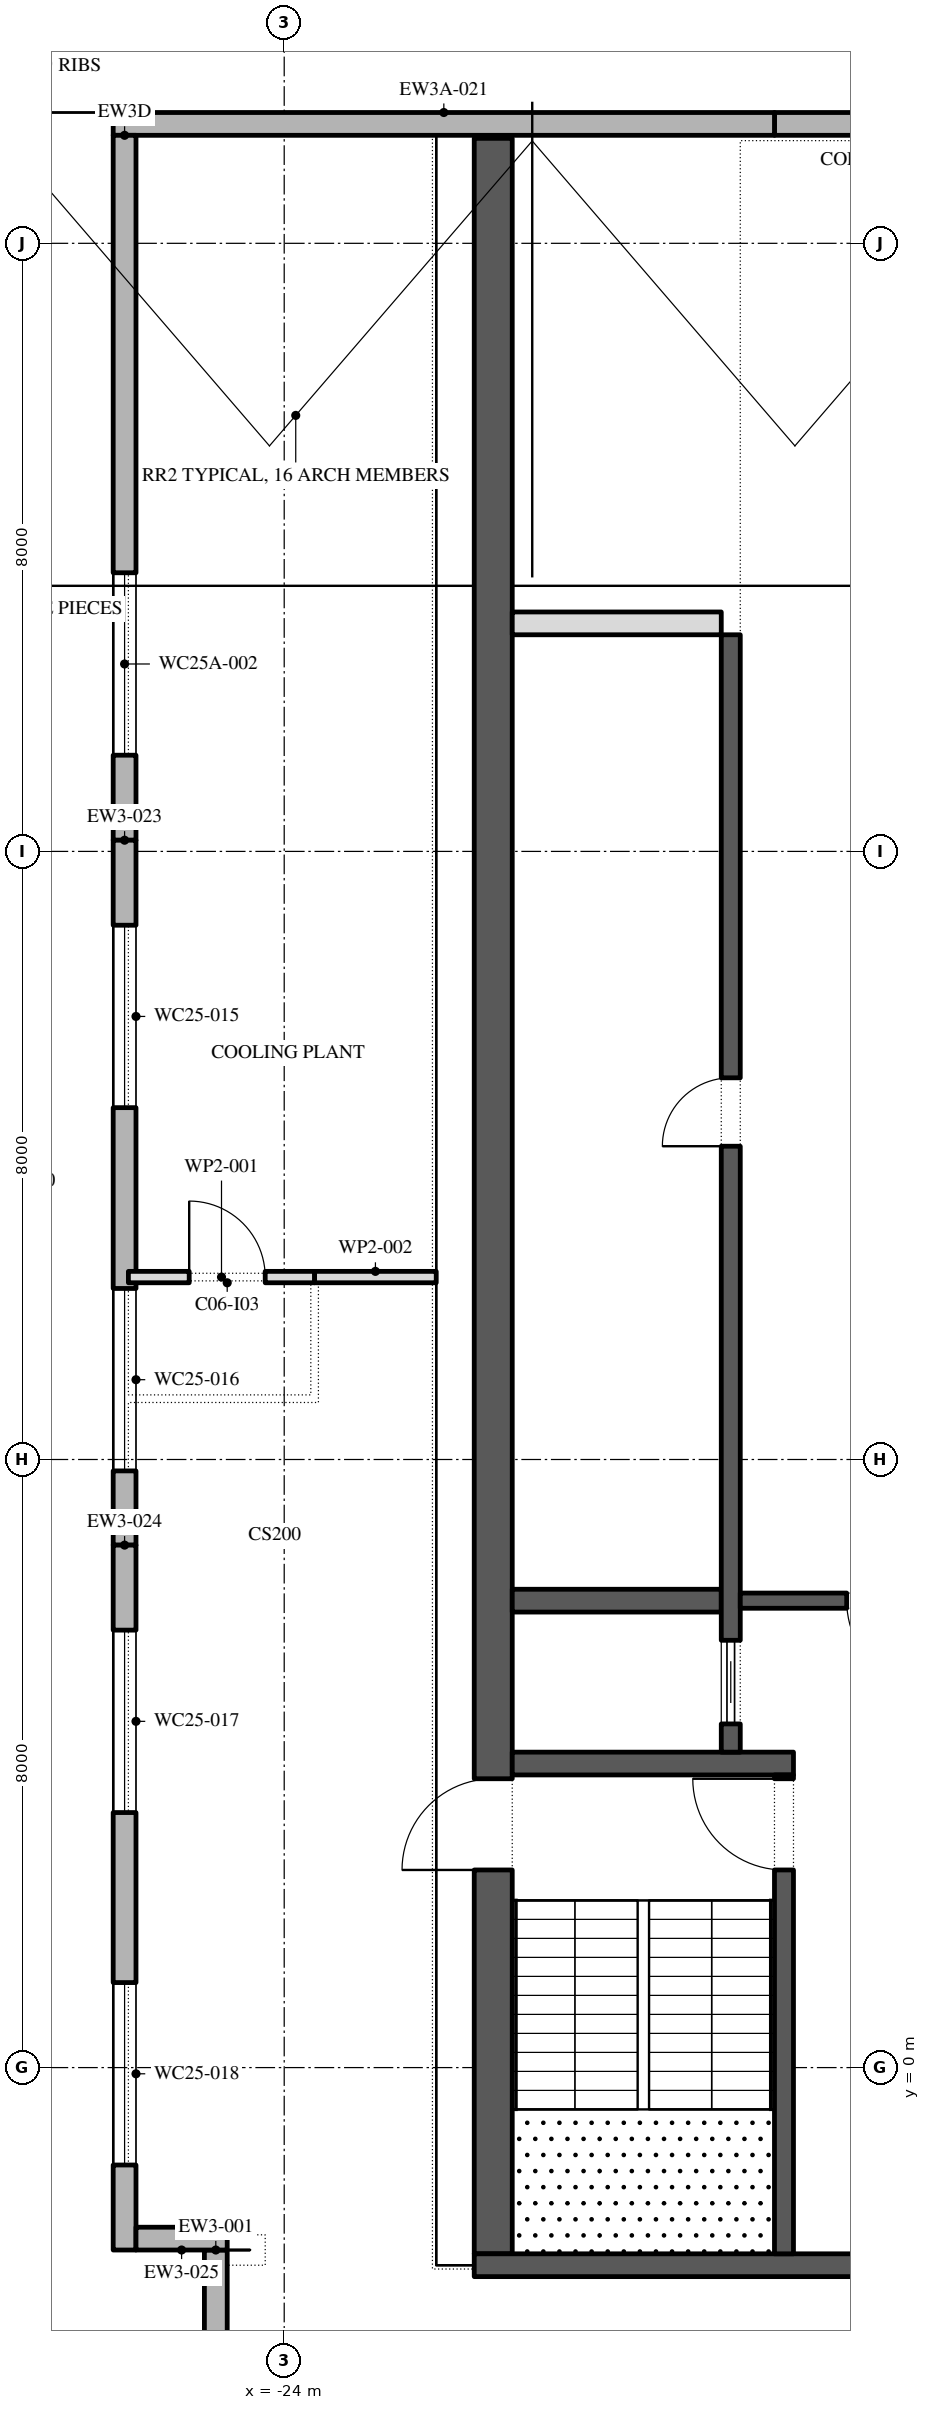
"""IFC4 building model, lengths in metres.
Left out: names, types, materials, properties, quantities, classifications, styles, units other than length and angle.
Written with IfcOpenShell. Run it as: python <this file> out.ifc"""

import sys

from ifc_helpers import new_model, si_unit, direction, frame, frame_2d, origin, place, context, subcontext, project, spatial, polyline, rectangle, outline, extrude, element, fill, save


model = new_model("IFC4")
c1 = context("Model", 3, precision=1e-05, world=origin(), true_north=direction((0.0, 1.0)))
c2 = subcontext(c1, "Body", "Model", "MODEL_VIEW")
j1 = project(units=[si_unit("LENGTHUNIT", "METRE"), si_unit("PLANEANGLEUNIT", "RADIAN")], contexts=[c1])
p1 = place(None, origin())
s1 = spatial("IfcSite", under=j1, at=p1, CompositionType="ELEMENT")
p2 = place(p1, origin())
s2 = spatial("IfcBuilding", under=s1, at=p2, CompositionType="ELEMENT")
p3 = place(p2, frame((0.0, 0.0, 390.0)))
s3 = spatial("IfcBuildingStorey", under=s2, at=p3, CompositionType="ELEMENT", Elevation=390.0)
p4 = place(p3, frame((-24.9, -2.4, 0.0), z_axis=(0.0, 0.0, 1.0), x_axis=(0.0, -1.0, 0.0)))
e1 = element("IfcWall", 1, at=p4, inside=s3, PredefinedType="STANDARD", context=c2, shape_type="SweptSolid", body=[
    extrude(rectangle(XDim=1.8, YDim=0.3, at=frame_2d((0.9, 0.0))), origin(), (0.0, 0.0, 1.0), 4.0),
])
for number, where, z_axis, x_axis in (
    (2, (-8.85, 25.571, 0.0), (0.0, 0.0, 1.0), (-1.0, 0.0, 0.0)),
    (3, (-17.55, 25.571, 0.0), (0.0, 0.0, 1.0), (-1.0, 0.0, 0.0)),
):
    element("IfcWall", number, at=place(p3, frame(where, z_axis=z_axis, x_axis=x_axis)), inside=s3, PredefinedType="STANDARD", context=c2, shape_type="SweptSolid", body=[
        extrude(rectangle(XDim=8.7, YDim=0.3, at=frame_2d((4.35, 0.0))), origin(), (0.0, 0.0, 1.0), 2.2),
    ])
p5 = place(p3, frame((-26.1, 25.421, 0.0), z_axis=(0.0, 0.0, 1.0), x_axis=(0.0, -1.0, 0.0)))
e4 = element("IfcWall", 4, at=p5, inside=s3, PredefinedType="STANDARD", context=c2, shape_type="SweptSolid", body=[
    extrude(outline(polyline([(0.0, 0.0), (9.274, 0.0), (9.274, 4.0), (5.927, 4.0), (5.927, 6.298), (5.907, 6.285), (2.519, 4.0), (0.0, 2.301), (0.0, 0.0)])), frame((0.0, 0.15, 0.0), z_axis=(0.0, -1.0, 0.0), x_axis=(1.0, 0.0, 0.0)), (0.0, 0.0, 1.0), 0.3),
])
p6 = place(p5, frame((5.755, 0.0, 0.8)))
e5 = element("IfcOpeningElement", 5, at=p6, cuts=e4, PredefinedType="OPENING", context=c2, shape_type="SweptSolid", body=[
    extrude(outline(polyline([(0.0, 0.0), (2.4, 0.0), (2.4, 0.85), (2.377, 1.088), (2.31, 1.317), (2.2, 1.529), (2.051, 1.717), (1.87, 1.872), (1.663, 1.991), (1.437, 2.068), (1.2, 2.1), (0.963, 2.068), (0.737, 1.991), (0.53, 1.872), (0.349, 1.717), (0.2, 1.529), (0.09, 1.317), (0.023, 1.088), (0.0, 0.85), (0.0, 0.0)])), frame((0.0, 0.16, 0.0), z_axis=(0.0, -1.0, 0.0), x_axis=(1.0, 0.0, 0.0)), (0.0, 0.0, 1.0), 0.32),
])
p7 = place(p3, frame((-26.1, 16.147, 0.0), z_axis=(0.0, 0.0, 1.0), x_axis=(0.0, -1.0, 0.0)))
e6 = element("IfcWall", 6, at=p7, inside=s3, PredefinedType="STANDARD", context=c2, shape_type="SweptSolid", body=[
    extrude(rectangle(XDim=9.274, YDim=0.3, at=frame_2d((4.637, 0.0))), origin(), (0.0, 0.0, 1.0), 4.0),
])
p8 = place(p7, frame((1.118, 0.0, 0.8)))
e7 = element("IfcOpeningElement", 7, at=p8, cuts=e6, PredefinedType="OPENING", context=c2, shape_type="SweptSolid", body=[
    extrude(outline(polyline([(0.0, 0.0), (2.4, 0.0), (2.4, 1.25), (2.377, 1.488), (2.31, 1.717), (2.2, 1.929), (2.051, 2.116), (1.87, 2.272), (1.663, 2.391), (1.437, 2.468), (1.2, 2.5), (0.963, 2.468), (0.737, 2.391), (0.53, 2.272), (0.349, 2.116), (0.2, 1.929), (0.09, 1.717), (0.023, 1.488), (0.0, 1.25), (0.0, 0.0)])), frame((0.0, 0.16, 0.0), z_axis=(0.0, -1.0, 0.0), x_axis=(1.0, 0.0, 0.0)), (0.0, 0.0, 1.0), 0.32),
])
p9 = place(p7, frame((5.897, 0.0, 0.8)))
e8 = element("IfcOpeningElement", 8, at=p9, cuts=e6, PredefinedType="OPENING", context=c2, shape_type="SweptSolid", body=[
    extrude(outline(polyline([(0.0, 0.0), (2.4, 0.0), (2.4, 1.25), (2.377, 1.488), (2.31, 1.717), (2.2, 1.929), (2.051, 2.116), (1.87, 2.272), (1.663, 2.391), (1.437, 2.468), (1.2, 2.5), (0.963, 2.468), (0.737, 2.391), (0.53, 2.272), (0.349, 2.116), (0.2, 1.929), (0.09, 1.717), (0.023, 1.488), (0.0, 1.25), (0.0, 0.0)])), frame((0.0, 0.16, 0.0), z_axis=(0.0, -1.0, 0.0), x_axis=(1.0, 0.0, 0.0)), (0.0, 0.0, 1.0), 0.32),
])
p10 = place(p3, frame((-26.1, 6.874, 0.0), z_axis=(0.0, 0.0, 1.0), x_axis=(0.0, -1.0, 0.0)))
e9 = element("IfcWall", 9, at=p10, inside=s3, PredefinedType="STANDARD", context=c2, shape_type="SweptSolid", body=[
    extrude(rectangle(XDim=9.273, YDim=0.3, at=frame_2d((4.637, 0.0))), origin(), (0.0, 0.0, 1.0), 4.0),
])
p11 = place(p10, frame((1.118, 0.0, 0.8)))
e10 = element("IfcOpeningElement", 10, at=p11, cuts=e9, PredefinedType="OPENING", context=c2, shape_type="SweptSolid", body=[
    extrude(outline(polyline([(0.0, 0.0), (2.4, 0.0), (2.4, 1.25), (2.377, 1.488), (2.31, 1.717), (2.2, 1.929), (2.051, 2.116), (1.87, 2.272), (1.663, 2.391), (1.437, 2.468), (1.2, 2.5), (0.963, 2.468), (0.737, 2.391), (0.53, 2.272), (0.349, 2.116), (0.2, 1.929), (0.09, 1.717), (0.023, 1.488), (0.0, 1.25), (0.0, 0.0)])), frame((0.0, 0.16, 0.0), z_axis=(0.0, -1.0, 0.0), x_axis=(1.0, 0.0, 0.0)), (0.0, 0.0, 1.0), 0.32),
])
p12 = place(p10, frame((5.755, 0.0, 0.8)))
e11 = element("IfcOpeningElement", 11, at=p12, cuts=e9, PredefinedType="OPENING", context=c2, shape_type="SweptSolid", body=[
    extrude(outline(polyline([(0.0, 0.0), (2.4, 0.0), (2.4, 1.25), (2.377, 1.488), (2.31, 1.717), (2.2, 1.929), (2.051, 2.116), (1.87, 2.272), (1.663, 2.391), (1.437, 2.468), (1.2, 2.5), (0.963, 2.468), (0.737, 2.391), (0.53, 2.272), (0.349, 2.116), (0.2, 1.929), (0.09, 1.717), (0.023, 1.488), (0.0, 1.25), (0.0, 0.0)])), frame((0.0, 0.16, 0.0), z_axis=(0.0, -1.0, 0.0), x_axis=(1.0, 0.0, 0.0)), (0.0, 0.0, 1.0), 0.32),
])
p13 = place(p3, frame((-25.95, -2.25, 0.0), z_axis=(0.0, 0.0, 1.0), x_axis=(1.0, 0.0, 0.0)))
e12 = element("IfcWall", 12, at=p13, inside=s3, PredefinedType="STANDARD", context=c2, shape_type="SweptSolid", body=[
    extrude(rectangle(XDim=1.2, YDim=0.3, at=frame_2d((0.6, 0.0))), origin(), (0.0, 0.0, 1.0), 4.0),
])
p14 = place(p3, frame((-21.25, -2.45, 0.0), z_axis=(0.0, 0.0, 1.0), x_axis=(0.0, 1.0, 0.0)))
e13 = element("IfcWall", 13, at=p14, inside=s3, PredefinedType="SHEAR", context=c2, shape_type="SweptSolid", body=[
    extrude(outline(polyline([(0.0, 0.0), (27.831, 0.0), (27.831, 0.754), (23.018, 4.0), (0.0, 4.0), (0.0, 0.0)])), frame((0.0, 0.25, 0.0), z_axis=(0.0, -1.0, 0.0), x_axis=(1.0, 0.0, 0.0)), (0.0, 0.0, 1.0), 0.5),
])
p15 = place(p14, frame((5.05, 0.0, 0.0)))
e14 = element("IfcOpeningElement", 14, at=p15, cuts=e13, PredefinedType="OPENING", context=c2, shape_type="SweptSolid", body=[
    extrude(rectangle(XDim=1.2, YDim=2.1, at=frame_2d((0.6, 1.05))), frame((0.0, 0.26, 0.0), z_axis=(0.0, -1.0, 0.0), x_axis=(1.0, 0.0, 0.0)), (0.0, 0.0, 1.0), 0.52),
])
p16 = place(p3, frame((-21.5, -2.6, 0.0), z_axis=(0.0, 0.0, 1.0), x_axis=(1.0, 0.0, 0.0)))
e15 = element("IfcWall", 15, at=p16, inside=s3, PredefinedType="SHEAR", context=c2, shape_type="SweptSolid", body=[
    extrude(rectangle(XDim=11.0, YDim=0.3, at=frame_2d((5.5, 0.0))), origin(), (0.0, 0.0, 1.0), 4.0),
])
p17 = place(p3, frame((-21.0, 4.0, 0.0), z_axis=(0.0, 0.0, 1.0), x_axis=(1.0, 0.0, 0.0)))
e16 = element("IfcWall", 16, at=p17, inside=s3, PredefinedType="SHEAR", context=c2, shape_type="SweptSolid", body=[
    extrude(rectangle(XDim=3.7, YDim=0.3, at=frame_2d((1.85, 0.0))), origin(), (0.0, 0.0, 1.0), 4.0),
])
p18 = place(p3, frame((-17.425, -2.45, 0.0), z_axis=(0.0, 0.0, 1.0), x_axis=(0.0, 1.0, 0.0)))
e17 = element("IfcWall", 17, at=p18, inside=s3, PredefinedType="SHEAR", context=c2, shape_type="SweptSolid", body=[
    extrude(rectangle(XDim=6.3, YDim=0.25, at=frame_2d((3.15, 0.0))), origin(), (0.0, 0.0, 1.0), 4.0),
])
p19 = place(p18, frame((5.05, 0.0, 0.0)))
e18 = element("IfcOpeningElement", 18, at=p19, cuts=e17, PredefinedType="OPENING", context=c2, shape_type="SweptSolid", body=[
    extrude(rectangle(XDim=1.2, YDim=2.1, at=frame_2d((0.6, 1.05))), frame((0.0, 0.135, 0.0), z_axis=(0.0, -1.0, 0.0), x_axis=(1.0, 0.0, 0.0)), (0.0, 0.0, 1.0), 0.27),
])
p20 = place(p3, frame((-21.0, 6.143, 0.0), z_axis=(0.0, 0.0, 1.0), x_axis=(1.0, 0.0, 0.0)))
e19 = element("IfcWall", 19, at=p20, inside=s3, PredefinedType="SHEAR", context=c2, shape_type="SweptSolid", body=[
    extrude(rectangle(XDim=2.75, YDim=0.3, at=frame_2d((1.375, 0.0))), origin(), (0.0, 0.0, 1.0), 4.0),
])
p21 = place(p3, frame((-18.125, 4.15, 0.0), z_axis=(0.0, 0.0, 1.0), x_axis=(0.0, 1.0, 0.0)))
e20 = element("IfcWall", 20, at=p21, inside=s3, PredefinedType="SHEAR", context=c2, shape_type="SweptSolid", body=[
    extrude(rectangle(XDim=14.7, YDim=0.25, at=frame_2d((7.35, 0.0))), origin(), (0.0, 0.0, 1.0), 4.0),
])
p22 = place(p21, frame((7.971, 0.0, 0.0)))
e21 = element("IfcOpeningElement", 21, at=p22, cuts=e20, PredefinedType="OPENING", context=c2, shape_type="SweptSolid", body=[
    extrude(rectangle(XDim=0.9, YDim=2.1, at=frame_2d((0.45, 1.05))), frame((0.0, 0.135, 0.0), z_axis=(0.0, -1.0, 0.0), x_axis=(1.0, 0.0, 0.0)), (0.0, 0.0, 1.0), 0.27),
])
p23 = place(p21, frame((0.371, 0.0, 0.0)))
e22 = element("IfcOpeningElement", 22, at=p23, cuts=e20, PredefinedType="OPENING", context=c2, shape_type="SweptSolid", body=[
    extrude(rectangle(XDim=1.1, YDim=2.1, at=frame_2d((0.55, 1.05))), frame((0.0, 0.135, 0.0), z_axis=(0.0, -1.0, 0.0), x_axis=(1.0, 0.0, 0.0)), (0.0, 0.0, 1.0), 0.27),
])
p24 = place(p3, frame((-21.0, 19.0, 0.0), z_axis=(0.0, 0.0, 1.0), x_axis=(1.0, 0.0, 0.0)))
e23 = element("IfcWall", 23, at=p24, inside=s3, PredefinedType="PARTITIONING", context=c2, shape_type="SweptSolid", body=[
    extrude(rectangle(XDim=2.75, YDim=0.3, at=frame_2d((1.375, 0.0))), origin(), (0.0, 0.0, 1.0), 4.0),
])
p25 = place(p3, frame((-18.0, 6.143, 0.0), z_axis=(0.0, 0.0, 1.0), x_axis=(1.0, 0.0, 0.0)))
e24 = element("IfcWall", 24, at=p25, inside=s3, PredefinedType="SHEAR", context=c2, shape_type="SweptSolid", body=[
    extrude(rectangle(XDim=4.0, YDim=0.2, at=frame_2d((2.0, 0.0))), origin(), (0.0, 0.0, 1.0), 4.0),
])
p26 = place(p25, frame((1.4, 0.0, 0.0)))
e25 = element("IfcOpeningElement", 25, at=p26, cuts=e24, PredefinedType="OPENING", context=c2, shape_type="SweptSolid", body=[
    extrude(rectangle(XDim=1.2, YDim=2.1, at=frame_2d((0.6, 1.05))), frame((0.0, 0.11, 0.0), z_axis=(0.0, -1.0, 0.0), x_axis=(1.0, 0.0, 0.0)), (0.0, 0.0, 1.0), 0.22),
])
p27 = place(p3, frame((-26.05, 10.4, 0.0), z_axis=(0.0, 0.0, 1.0), x_axis=(1.0, 0.0, 0.0)))
e26 = element("IfcWall", 26, at=p27, inside=s3, PredefinedType="PARTITIONING", context=c2, shape_type="SweptSolid", body=[
    extrude(rectangle(XDim=2.45, YDim=0.15, at=frame_2d((1.225, 0.0))), origin(), (0.0, 0.0, 1.0), 4.0),
])
p28 = place(p27, frame((0.8, 0.0, 0.0)))
e27 = element("IfcOpeningElement", 27, at=p28, cuts=e26, PredefinedType="OPENING", context=c2, shape_type="SweptSolid", body=[
    extrude(rectangle(XDim=1.0, YDim=2.1, at=frame_2d((0.5, 1.05))), frame((0.0, 0.085, 0.0), z_axis=(0.0, -1.0, 0.0), x_axis=(1.0, 0.0, 0.0)), (0.0, 0.0, 1.0), 0.17),
])
p29 = place(p3, frame((-23.6, 10.4, 0.0), z_axis=(0.0, 0.0, 1.0), x_axis=(1.0, 0.0, 0.0)))
e28 = element("IfcWall", 28, at=p29, inside=s3, PredefinedType="PARTITIONING", context=c2, shape_type="SweptSolid", body=[
    extrude(rectangle(XDim=1.6, YDim=0.15, at=frame_2d((0.8, 0.0))), origin(), (0.0, 0.0, 1.0), 4.0),
])
p30 = place(p6, origin())
e29 = element("IfcWindow", 29, at=p30, inside=s3, PartitioningType="DOUBLE_PANEL_VERTICAL", PredefinedType="WINDOW", context=c2, shape_type="SweptSolid", body=[
    extrude(outline(polyline([(0.0, 0.0), (2.4, 0.0), (2.4, 0.85), (2.377, 1.088), (2.31, 1.317), (2.2, 1.529), (2.051, 1.717), (1.87, 1.872), (1.663, 1.991), (1.437, 2.068), (1.2, 2.1), (0.963, 2.068), (0.737, 1.991), (0.53, 1.872), (0.349, 1.717), (0.2, 1.529), (0.09, 1.317), (0.023, 1.088), (0.0, 0.85), (0.0, 0.0)])), frame((0.0, 0.03, 0.0), z_axis=(0.0, -1.0, 0.0), x_axis=(1.0, 0.0, 0.0)), (0.0, 0.0, 1.0), 0.06),
])
fill(e5, e29)
p31 = place(p8, origin())
e30 = element("IfcWindow", 30, at=p31, inside=s3, PartitioningType="DOUBLE_PANEL_VERTICAL", PredefinedType="WINDOW", context=c2, shape_type="SweptSolid", body=[
    extrude(outline(polyline([(0.0, 0.0), (2.4, 0.0), (2.4, 1.25), (2.377, 1.488), (2.31, 1.717), (2.2, 1.929), (2.051, 2.116), (1.87, 2.272), (1.663, 2.391), (1.437, 2.468), (1.2, 2.5), (0.963, 2.468), (0.737, 2.391), (0.53, 2.272), (0.349, 2.116), (0.2, 1.929), (0.09, 1.717), (0.023, 1.488), (0.0, 1.25), (0.0, 0.0)])), frame((0.0, 0.03, 0.0), z_axis=(0.0, -1.0, 0.0), x_axis=(1.0, 0.0, 0.0)), (0.0, 0.0, 1.0), 0.06),
])
fill(e7, e30)
p32 = place(p9, origin())
e31 = element("IfcWindow", 31, at=p32, inside=s3, PartitioningType="DOUBLE_PANEL_VERTICAL", PredefinedType="WINDOW", context=c2, shape_type="SweptSolid", body=[
    extrude(outline(polyline([(0.0, 0.0), (2.4, 0.0), (2.4, 1.25), (2.377, 1.488), (2.31, 1.717), (2.2, 1.929), (2.051, 2.116), (1.87, 2.272), (1.663, 2.391), (1.437, 2.468), (1.2, 2.5), (0.963, 2.468), (0.737, 2.391), (0.53, 2.272), (0.349, 2.116), (0.2, 1.929), (0.09, 1.717), (0.023, 1.488), (0.0, 1.25), (0.0, 0.0)])), frame((0.0, 0.03, 0.0), z_axis=(0.0, -1.0, 0.0), x_axis=(1.0, 0.0, 0.0)), (0.0, 0.0, 1.0), 0.06),
])
fill(e8, e31)
p33 = place(p11, origin())
e32 = element("IfcWindow", 32, at=p33, inside=s3, PartitioningType="DOUBLE_PANEL_VERTICAL", PredefinedType="WINDOW", context=c2, shape_type="SweptSolid", body=[
    extrude(outline(polyline([(0.0, 0.0), (2.4, 0.0), (2.4, 1.25), (2.377, 1.488), (2.31, 1.717), (2.2, 1.929), (2.051, 2.116), (1.87, 2.272), (1.663, 2.391), (1.437, 2.468), (1.2, 2.5), (0.963, 2.468), (0.737, 2.391), (0.53, 2.272), (0.349, 2.116), (0.2, 1.929), (0.09, 1.717), (0.023, 1.488), (0.0, 1.25), (0.0, 0.0)])), frame((0.0, 0.03, 0.0), z_axis=(0.0, -1.0, 0.0), x_axis=(1.0, 0.0, 0.0)), (0.0, 0.0, 1.0), 0.06),
])
fill(e10, e32)
p34 = place(p12, origin())
e33 = element("IfcWindow", 33, at=p34, inside=s3, PartitioningType="DOUBLE_PANEL_VERTICAL", PredefinedType="WINDOW", context=c2, shape_type="SweptSolid", body=[
    extrude(outline(polyline([(0.0, 0.0), (2.4, 0.0), (2.4, 1.25), (2.377, 1.488), (2.31, 1.717), (2.2, 1.929), (2.051, 2.116), (1.87, 2.272), (1.663, 2.391), (1.437, 2.468), (1.2, 2.5), (0.963, 2.468), (0.737, 2.391), (0.53, 2.272), (0.349, 2.116), (0.2, 1.929), (0.09, 1.717), (0.023, 1.488), (0.0, 1.25), (0.0, 0.0)])), frame((0.0, 0.03, 0.0), z_axis=(0.0, -1.0, 0.0), x_axis=(1.0, 0.0, 0.0)), (0.0, 0.0, 1.0), 0.06),
])
fill(e11, e33)
p35 = place(p22, origin())
e34 = element("IfcDoor", 34, at=p35, inside=s3, OperationType="SINGLE_SWING_RIGHT", PredefinedType="DOOR", context=c2, shape_type="SweptSolid", body=[
    extrude(rectangle(XDim=0.9, YDim=2.1, at=frame_2d((0.45, 1.05))), frame((0.0, 0.125, 0.0), z_axis=(0.0, -1.0, 0.0), x_axis=(1.0, 0.0, 0.0)), (0.0, 0.0, 1.0), 0.05),
])
fill(e21, e34)
p36 = place(p23, origin())
e35 = element("IfcDoor", 35, at=p36, inside=s3, OperationType="SLIDING_TO_LEFT", PredefinedType="DOOR", context=c2, shape_type="SweptSolid", body=[
    extrude(rectangle(XDim=1.1, YDim=2.1, at=frame_2d((0.55, 1.05))), frame((0.0, 0.025, 0.0), z_axis=(0.0, -1.0, 0.0), x_axis=(1.0, 0.0, 0.0)), (0.0, 0.0, 1.0), 0.05),
])
fill(e22, e35)
p37 = place(p26, frame((1.2, 0.0, 0.0), z_axis=(0.0, 0.0, 1.0), x_axis=(-1.0, 0.0, 0.0)))
e36 = element("IfcDoor", 36, at=p37, inside=s3, OperationType="SINGLE_SWING_RIGHT", PredefinedType="DOOR", context=c2, shape_type="SweptSolid", body=[
    extrude(rectangle(XDim=1.2, YDim=2.1, at=frame_2d((0.6, 1.05))), frame((0.0, 0.025, 0.0), z_axis=(0.0, -1.0, 0.0), x_axis=(1.0, 0.0, 0.0)), (0.0, 0.0, 1.0), 0.05),
])
fill(e25, e36)
p38 = place(p19, origin())
e37 = element("IfcDoor", 37, at=p38, inside=s3, OperationType="SINGLE_SWING_LEFT", PredefinedType="DOOR", context=c2, shape_type="SweptSolid", body=[
    extrude(rectangle(XDim=1.2, YDim=2.1, at=frame_2d((0.6, 1.05))), frame((0.0, 0.025, 0.0), z_axis=(0.0, -1.0, 0.0), x_axis=(1.0, 0.0, 0.0)), (0.0, 0.0, 1.0), 0.05),
])
fill(e18, e37)
p39 = place(p15, origin())
e38 = element("IfcDoor", 38, at=p39, inside=s3, OperationType="SINGLE_SWING_RIGHT", PredefinedType="DOOR", context=c2, shape_type="SweptSolid", body=[
    extrude(rectangle(XDim=1.2, YDim=2.1, at=frame_2d((0.6, 1.05))), frame((0.0, 0.025, 0.0), z_axis=(0.0, -1.0, 0.0), x_axis=(1.0, 0.0, 0.0)), (0.0, 0.0, 1.0), 0.05),
])
fill(e14, e38)
p40 = place(p28, origin())
e39 = element("IfcDoor", 39, at=p40, inside=s3, OperationType="SINGLE_SWING_RIGHT", PredefinedType="DOOR", context=c2, shape_type="SweptSolid", body=[
    extrude(rectangle(XDim=1.0, YDim=2.1, at=frame_2d((0.5, 1.05))), frame((0.0, 0.025, 0.0), z_axis=(0.0, -1.0, 0.0), x_axis=(1.0, 0.0, 0.0)), (0.0, 0.0, 1.0), 0.05),
])
fill(e27, e39)
save(model, sys.argv[1])
